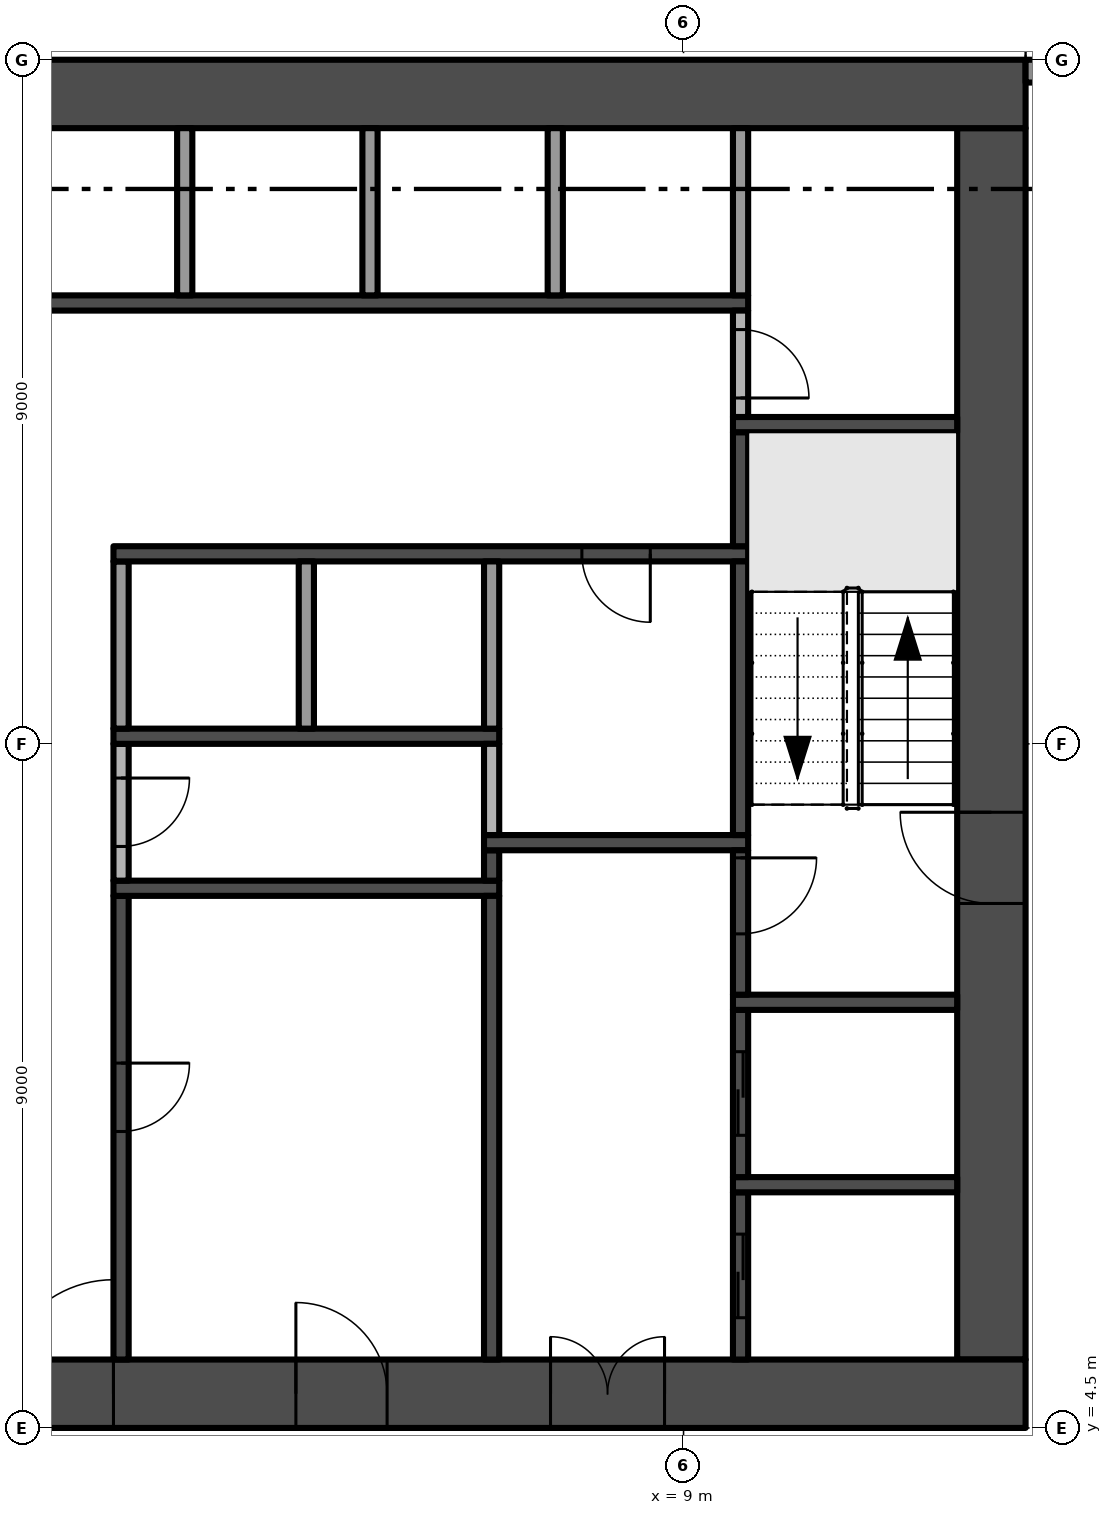
"""IFC4 building model, lengths in metres.
Left out: names, types, materials, properties, quantities, classifications, styles, units other than length and angle.
Written with IfcOpenShell. Run it as: python <this file> out.ifc"""

import sys

from ifc_helpers import new_model, si_unit, direction, frame, frame_2d, origin, place, context, subcontext, project, spatial, rectangle, extrude, element, fill, save


model = new_model("IFC4")
c1 = context("Model", 3, precision=1e-05, world=origin(), true_north=direction((0.0, 1.0)))
c2 = subcontext(c1, "Body", "Model", "MODEL_VIEW")
j1 = project(units=[si_unit("LENGTHUNIT", "METRE"), si_unit("PLANEANGLEUNIT", "RADIAN")], contexts=[c1])
p1 = place(None, origin())
s1 = spatial("IfcSite", under=j1, at=p1, CompositionType="ELEMENT")
p2 = place(p1, origin())
s2 = spatial("IfcBuilding", under=s1, at=p2, CompositionType="ELEMENT")
p3 = place(p2, frame((0.0, 0.0, 103.6)))
s3 = spatial("IfcBuildingStorey", under=s2, at=p3, CompositionType="ELEMENT", Elevation=103.6)
p4 = place(p3, frame((-13.5, 4.95, -0.3), z_axis=(0.0, 0.0, 1.0), x_axis=(1.0, 0.0, 0.0)))
e1 = element("IfcWall", 1, at=p4, inside=s3, PredefinedType="SHEAR", context=c2, shape_type="SweptSolid", body=[
    extrude(rectangle(XDim=27.0, YDim=0.9, at=frame_2d((13.5, 0.0))), origin(), (0.0, 0.0, 1.0), 3.8),
])
p5 = place(p4, frame((12.0, 0.0, 0.3)))
e2 = element("IfcOpeningElement", 2, at=p5, cuts=e1, PredefinedType="OPENING", context=c2, shape_type="SweptSolid", body=[
    extrude(rectangle(XDim=3.0, YDim=2.4, at=frame_2d((1.5, 1.2))), frame((0.0, 0.46, 0.0), z_axis=(0.0, -1.0, 0.0), x_axis=(1.0, 0.0, 0.0)), (0.0, 0.0, 1.0), 0.92),
])
p6 = place(p4, frame((4.9, 0.0, 0.3)))
e3 = element("IfcOpeningElement", 3, at=p6, cuts=e1, PredefinedType="OPENING", context=c2, shape_type="SweptSolid", body=[
    extrude(rectangle(XDim=1.2, YDim=2.2, at=frame_2d((0.6, 1.1))), frame((0.0, 0.46, 0.0), z_axis=(0.0, -1.0, 0.0), x_axis=(1.0, 0.0, 0.0)), (0.0, 0.0, 1.0), 0.92),
])
p7 = place(p4, frame((20.75, 0.0, 0.3)))
e4 = element("IfcOpeningElement", 4, at=p7, cuts=e1, PredefinedType="OPENING", context=c2, shape_type="SweptSolid", body=[
    extrude(rectangle(XDim=1.5, YDim=2.2, at=frame_2d((0.75, 1.1))), frame((0.0, 0.46, 0.0), z_axis=(0.0, -1.0, 0.0), x_axis=(1.0, 0.0, 0.0)), (0.0, 0.0, 1.0), 0.92),
])
p8 = place(p4, frame((17.4, 0.0, 0.3)))
e5 = element("IfcOpeningElement", 5, at=p8, cuts=e1, PredefinedType="OPENING", context=c2, shape_type="SweptSolid", body=[
    extrude(rectangle(XDim=1.2, YDim=2.2, at=frame_2d((0.6, 1.1))), frame((0.0, 0.46, 0.0), z_axis=(0.0, -1.0, 0.0), x_axis=(1.0, 0.0, 0.0)), (0.0, 0.0, 1.0), 0.92),
])
p9 = place(p3, frame((13.05, 5.4, -0.3), z_axis=(0.0, 0.0, 1.0), x_axis=(0.0, 1.0, 0.0)))
e6 = element("IfcWall", 6, at=p9, inside=s3, PredefinedType="SHEAR", context=c2, shape_type="SweptSolid", body=[
    extrude(rectangle(XDim=16.2, YDim=0.9, at=frame_2d((8.1, 0.0))), origin(), (0.0, 0.0, 1.0), 3.8),
])
p10 = place(p9, frame((6.0, 0.0, 0.3)))
e7 = element("IfcOpeningElement", 7, at=p10, cuts=e6, PredefinedType="OPENING", context=c2, shape_type="SweptSolid", body=[
    extrude(rectangle(XDim=1.2, YDim=2.2, at=frame_2d((0.6, 1.1))), frame((0.0, 0.46, 0.0), z_axis=(0.0, -1.0, 0.0), x_axis=(1.0, 0.0, 0.0)), (0.0, 0.0, 1.0), 0.92),
])
p11 = place(p3, frame((13.5, 22.05, -0.3), z_axis=(0.0, 0.0, 1.0), x_axis=(-1.0, 0.0, 0.0)))
e8 = element("IfcWall", 8, at=p11, inside=s3, PredefinedType="SHEAR", context=c2, shape_type="SweptSolid", body=[
    extrude(rectangle(XDim=27.0, YDim=0.9, at=frame_2d((13.5, 0.0))), origin(), (0.0, 0.0, 1.0), 3.8),
])
p12 = place(p3, frame((13.5, 22.35, 0.0), z_axis=(0.0, 0.0, 1.0), x_axis=(1.0, 0.0, 0.0)))
e9 = element("IfcWall", 9, at=p12, inside=s3, PredefinedType="SOLIDWALL", context=c2, shape_type="SweptSolid", body=[
    extrude(rectangle(XDim=3.875, YDim=0.3, at=frame_2d((1.938, 0.0))), origin(), (0.0, 0.0, 1.0), 3.5),
])
p13 = place(p12, frame((0.775, 0.0, 0.0)))
e10 = element("IfcOpeningElement", 10, at=p13, cuts=e9, PredefinedType="OPENING", context=c2, shape_type="SweptSolid", body=[
    extrude(rectangle(XDim=2.775, YDim=2.4, at=frame_2d((1.387, 1.2))), frame((0.0, 0.16, 0.0), z_axis=(0.0, -1.0, 0.0), x_axis=(1.0, 0.0, 0.0)), (0.0, 0.0, 1.0), 0.32),
])
p14 = place(p3, frame((-9.85, 19.3, 0.0), z_axis=(0.0, 0.0, 1.0), x_axis=(1.0, 0.0, 0.0)))
e11 = element("IfcWall", 11, at=p14, inside=s3, PredefinedType="SHEAR", context=c2, shape_type="SweptSolid", body=[
    extrude(rectangle(XDim=19.7, YDim=0.2, at=frame_2d((9.85, 0.0))), origin(), (0.0, 0.0, 1.0), 3.5),
])
p15 = place(p14, frame((0.769, 0.0, 0.0)))
e12 = element("IfcOpeningElement", 12, at=p15, cuts=e11, PredefinedType="OPENING", context=c2, shape_type="SweptSolid", body=[
    extrude(rectangle(XDim=1.1, YDim=2.1, at=frame_2d((0.55, 1.05))), frame((0.0, 0.11, 0.0), z_axis=(0.0, -1.0, 0.0), x_axis=(1.0, 0.0, 0.0)), (0.0, 0.0, 1.0), 0.22),
])
p16 = place(p14, frame((3.206, 0.0, 0.0)))
e13 = element("IfcOpeningElement", 13, at=p16, cuts=e11, PredefinedType="OPENING", context=c2, shape_type="SweptSolid", body=[
    extrude(rectangle(XDim=1.1, YDim=2.1, at=frame_2d((0.55, 1.05))), frame((0.0, 0.11, 0.0), z_axis=(0.0, -1.0, 0.0), x_axis=(1.0, 0.0, 0.0)), (0.0, 0.0, 1.0), 0.22),
])
p17 = place(p14, frame((5.644, 0.0, 0.0)))
e14 = element("IfcOpeningElement", 14, at=p17, cuts=e11, PredefinedType="OPENING", context=c2, shape_type="SweptSolid", body=[
    extrude(rectangle(XDim=1.1, YDim=2.1, at=frame_2d((0.55, 1.05))), frame((0.0, 0.11, 0.0), z_axis=(0.0, -1.0, 0.0), x_axis=(1.0, 0.0, 0.0)), (0.0, 0.0, 1.0), 0.22),
])
p18 = place(p14, frame((8.081, 0.0, 0.0)))
e15 = element("IfcOpeningElement", 15, at=p18, cuts=e11, PredefinedType="OPENING", context=c2, shape_type="SweptSolid", body=[
    extrude(rectangle(XDim=1.1, YDim=2.1, at=frame_2d((0.55, 1.05))), frame((0.0, 0.11, 0.0), z_axis=(0.0, -1.0, 0.0), x_axis=(1.0, 0.0, 0.0)), (0.0, 0.0, 1.0), 0.22),
])
p19 = place(p3, frame((1.6, 11.5, 0.0), z_axis=(0.0, 0.0, 1.0), x_axis=(0.0, -1.0, 0.0)))
e16 = element("IfcWall", 16, at=p19, inside=s3, PredefinedType="SHEAR", context=c2, shape_type="SweptSolid", body=[
    extrude(rectangle(XDim=6.1, YDim=0.2, at=frame_2d((3.05, 0.0))), origin(), (0.0, 0.0, 1.0), 3.5),
])
p20 = place(p19, frame((2.2, 0.0, 0.0)))
e17 = element("IfcOpeningElement", 17, at=p20, cuts=e16, PredefinedType="OPENING", context=c2, shape_type="SweptSolid", body=[
    extrude(rectangle(XDim=0.9, YDim=2.1, at=frame_2d((0.45, 1.05))), frame((0.0, 0.11, 0.0), z_axis=(0.0, -1.0, 0.0), x_axis=(1.0, 0.0, 0.0)), (0.0, 0.0, 1.0), 0.22),
])
p21 = place(p3, frame((1.5, 11.6, 0.0), z_axis=(0.0, 0.0, 1.0), x_axis=(1.0, 0.0, 0.0)))
e18 = element("IfcWall", 18, at=p21, inside=s3, PredefinedType="SHEAR", context=c2, shape_type="SweptSolid", body=[
    extrude(rectangle(XDim=5.075, YDim=0.2, at=frame_2d((2.538, 0.0))), origin(), (0.0, 0.0, 1.0), 3.5),
])
p22 = place(p3, frame((1.6, 13.5, 0.0), z_axis=(0.0, 0.0, 1.0), x_axis=(0.0, -1.0, 0.0)))
e19 = element("IfcWall", 19, at=p22, inside=s3, PredefinedType="PARTITIONING", context=c2, shape_type="SweptSolid", body=[
    extrude(rectangle(XDim=1.8, YDim=0.2, at=frame_2d((0.9, 0.0))), origin(), (0.0, 0.0, 1.0), 3.5),
])
p23 = place(p22, frame((0.45, 0.0, 0.0)))
e20 = element("IfcOpeningElement", 20, at=p23, cuts=e19, PredefinedType="OPENING", context=c2, shape_type="SweptSolid", body=[
    extrude(rectangle(XDim=0.9, YDim=2.1, at=frame_2d((0.45, 1.05))), frame((0.0, 0.11, 0.0), z_axis=(0.0, -1.0, 0.0), x_axis=(1.0, 0.0, 0.0)), (0.0, 0.0, 1.0), 0.22),
])
p24 = place(p3, frame((1.5, 13.6, 0.0), z_axis=(0.0, 0.0, 1.0), x_axis=(1.0, 0.0, 0.0)))
e21 = element("IfcWall", 21, at=p24, inside=s3, PredefinedType="SHEAR", context=c2, shape_type="SweptSolid", body=[
    extrude(rectangle(XDim=5.075, YDim=0.2, at=frame_2d((2.538, 0.0))), origin(), (0.0, 0.0, 1.0), 3.5),
])
p25 = place(p3, frame((1.6, 13.7, 0.0), z_axis=(0.0, 0.0, 1.0), x_axis=(0.0, 1.0, 0.0)))
e22 = element("IfcWall", 22, at=p25, inside=s3, PredefinedType="PARTITIONING", context=c2, shape_type="SweptSolid", body=[
    extrude(rectangle(XDim=2.2, YDim=0.2, at=frame_2d((1.1, 0.0))), origin(), (0.0, 0.0, 1.0), 3.5),
])
p26 = place(p3, frame((9.85, 16.0, 0.0), z_axis=(0.0, 0.0, 1.0), x_axis=(-1.0, 0.0, 0.0)))
e23 = element("IfcWall", 23, at=p26, inside=s3, PredefinedType="SHEAR", context=c2, shape_type="SweptSolid", body=[
    extrude(rectangle(XDim=8.35, YDim=0.2, at=frame_2d((4.175, 0.0))), origin(), (0.0, 0.0, 1.0), 3.5),
])
p27 = place(p26, frame((1.288, 0.0, 0.0)))
e24 = element("IfcOpeningElement", 24, at=p27, cuts=e23, PredefinedType="OPENING", context=c2, shape_type="SweptSolid", body=[
    extrude(rectangle(XDim=0.9, YDim=2.1, at=frame_2d((0.45, 1.05))), frame((0.0, 0.11, 0.0), z_axis=(0.0, -1.0, 0.0), x_axis=(1.0, 0.0, 0.0)), (0.0, 0.0, 1.0), 0.22),
])
for number, where, z_axis, x_axis in (
    (25, (2.438, 19.4, 0.0), (0.0, 0.0, 1.0), (0.0, 1.0, 0.0)),
    (26, (4.037, 13.7, 0.0), (0.0, 0.0, 1.0), (0.0, 1.0, 0.0)),
    (27, (4.875, 19.4, 0.0), (0.0, 0.0, 1.0), (0.0, 1.0, 0.0)),
):
    element("IfcWall", number, at=place(p3, frame(where, z_axis=z_axis, x_axis=x_axis)), inside=s3, PredefinedType="PARTITIONING", context=c2, shape_type="SweptSolid", body=[
        extrude(rectangle(XDim=2.2, YDim=0.2, at=frame_2d((1.1, 0.0))), origin(), (0.0, 0.0, 1.0), 3.5),
    ])
p28 = place(p3, frame((6.475, 5.4, 0.0), z_axis=(0.0, 0.0, 1.0), x_axis=(0.0, 1.0, 0.0)))
e28 = element("IfcWall", 28, at=p28, inside=s3, PredefinedType="SHEAR", context=c2, shape_type="SweptSolid", body=[
    extrude(rectangle(XDim=6.1, YDim=0.2, at=frame_2d((3.05, 0.0))), origin(), (0.0, 0.0, 1.0), 3.5),
])
p29 = place(p3, frame((6.475, 11.7, 0.0), z_axis=(0.0, 0.0, 1.0), x_axis=(0.0, 1.0, 0.0)))
e29 = element("IfcWall", 29, at=p29, inside=s3, PredefinedType="SHEAR", context=c2, shape_type="SweptSolid", body=[
    extrude(rectangle(XDim=0.4, YDim=0.2, at=frame_2d((0.2, 0.0))), origin(), (0.0, 0.0, 1.0), 3.5),
])
p30 = place(p3, frame((6.375, 12.2, 0.0), z_axis=(0.0, 0.0, 1.0), x_axis=(1.0, 0.0, 0.0)))
e30 = element("IfcWall", 30, at=p30, inside=s3, PredefinedType="SHEAR", context=c2, shape_type="SweptSolid", body=[
    extrude(rectangle(XDim=3.475, YDim=0.2, at=frame_2d((1.738, 0.0))), origin(), (0.0, 0.0, 1.0), 3.5),
])
p31 = place(p3, frame((6.475, 12.3, 0.0), z_axis=(0.0, 0.0, 1.0), x_axis=(0.0, 1.0, 0.0)))
e31 = element("IfcWall", 31, at=p31, inside=s3, PredefinedType="PARTITIONING", context=c2, shape_type="SweptSolid", body=[
    extrude(rectangle(XDim=1.2, YDim=0.2, at=frame_2d((0.6, 0.0))), origin(), (0.0, 0.0, 1.0), 3.5),
])
for number, where, z_axis, x_axis in (
    (32, (6.475, 13.7, 0.0), (0.0, 0.0, 1.0), (0.0, 1.0, 0.0)),
    (33, (7.312, 19.4, 0.0), (0.0, 0.0, 1.0), (0.0, 1.0, 0.0)),
):
    element("IfcWall", number, at=place(p3, frame(where, z_axis=z_axis, x_axis=x_axis)), inside=s3, PredefinedType="PARTITIONING", context=c2, shape_type="SweptSolid", body=[
        extrude(rectangle(XDim=2.2, YDim=0.2, at=frame_2d((1.1, 0.0))), origin(), (0.0, 0.0, 1.0), 3.5),
    ])
p32 = place(p3, frame((9.75, 5.4, 0.0), z_axis=(0.0, 0.0, 1.0), x_axis=(0.0, 1.0, 0.0)))
e34 = element("IfcWall", 34, at=p32, inside=s3, PredefinedType="SHEAR", context=c2, shape_type="SweptSolid", body=[
    extrude(rectangle(XDim=2.2, YDim=0.2, at=frame_2d((1.1, 0.0))), origin(), (0.0, 0.0, 1.0), 3.5),
])
p33 = place(p32, frame((0.55, 0.0, 0.0)))
e35 = element("IfcOpeningElement", 35, at=p33, cuts=e34, PredefinedType="OPENING", context=c2, shape_type="SweptSolid", body=[
    extrude(rectangle(XDim=1.1, YDim=2.1, at=frame_2d((0.55, 1.05))), frame((0.0, 0.11, 0.0), z_axis=(0.0, -1.0, 0.0), x_axis=(1.0, 0.0, 0.0)), (0.0, 0.0, 1.0), 0.22),
])
p34 = place(p3, frame((9.65, 7.7, 0.0), z_axis=(0.0, 0.0, 1.0), x_axis=(1.0, 0.0, 0.0)))
e36 = element("IfcWall", 36, at=p34, inside=s3, PredefinedType="SHEAR", context=c2, shape_type="SweptSolid", body=[
    extrude(rectangle(XDim=2.95, YDim=0.2, at=frame_2d((1.475, 0.0))), origin(), (0.0, 0.0, 1.0), 3.5),
])
p35 = place(p3, frame((9.75, 7.8, 0.0), z_axis=(0.0, 0.0, 1.0), x_axis=(0.0, 1.0, 0.0)))
e37 = element("IfcWall", 37, at=p35, inside=s3, PredefinedType="SHEAR", context=c2, shape_type="SweptSolid", body=[
    extrude(rectangle(XDim=2.2, YDim=0.2, at=frame_2d((1.1, 0.0))), origin(), (0.0, 0.0, 1.0), 3.5),
])
p36 = place(p35, frame((0.55, 0.0, 0.0)))
e38 = element("IfcOpeningElement", 38, at=p36, cuts=e37, PredefinedType="OPENING", context=c2, shape_type="SweptSolid", body=[
    extrude(rectangle(XDim=1.1, YDim=2.1, at=frame_2d((0.55, 1.05))), frame((0.0, 0.11, 0.0), z_axis=(0.0, -1.0, 0.0), x_axis=(1.0, 0.0, 0.0)), (0.0, 0.0, 1.0), 0.22),
])
p37 = place(p3, frame((9.65, 10.1, 0.0), z_axis=(0.0, 0.0, 1.0), x_axis=(1.0, 0.0, 0.0)))
e39 = element("IfcWall", 39, at=p37, inside=s3, PredefinedType="SHEAR", context=c2, shape_type="SweptSolid", body=[
    extrude(rectangle(XDim=2.95, YDim=0.2, at=frame_2d((1.475, 0.0))), origin(), (0.0, 0.0, 1.0), 3.5),
])
p38 = place(p3, frame((9.75, 12.1, 0.0), z_axis=(0.0, 0.0, 1.0), x_axis=(0.0, -1.0, 0.0)))
e40 = element("IfcWall", 40, at=p38, inside=s3, PredefinedType="SHEAR", context=c2, shape_type="SweptSolid", body=[
    extrude(rectangle(XDim=1.9, YDim=0.2, at=frame_2d((0.95, 0.0))), origin(), (0.0, 0.0, 1.0), 3.5),
])
p39 = place(p38, frame((0.1, 0.0, 0.0)))
e41 = element("IfcOpeningElement", 41, at=p39, cuts=e40, PredefinedType="OPENING", context=c2, shape_type="SweptSolid", body=[
    extrude(rectangle(XDim=1.0, YDim=2.2, at=frame_2d((0.5, 1.1))), frame((0.0, 0.11, 0.0), z_axis=(0.0, -1.0, 0.0), x_axis=(1.0, 0.0, 0.0)), (0.0, 0.0, 1.0), 0.22),
])
p40 = place(p3, frame((9.75, 12.3, 0.0), z_axis=(0.0, 0.0, 1.0), x_axis=(0.0, 1.0, 0.0)))
e42 = element("IfcWall", 42, at=p40, inside=s3, PredefinedType="SHEAR", context=c2, shape_type="SweptSolid", body=[
    extrude(rectangle(XDim=3.6, YDim=0.2, at=frame_2d((1.8, 0.0))), origin(), (0.0, 0.0, 1.0), 3.5),
])
p41 = place(p3, frame((9.75, 16.1, 0.0), z_axis=(0.0, 0.0, 1.0), x_axis=(0.0, 1.0, 0.0)))
e43 = element("IfcWall", 43, at=p41, inside=s3, PredefinedType="SHEAR", context=c2, shape_type="SweptSolid", body=[
    extrude(rectangle(XDim=1.5, YDim=0.2, at=frame_2d((0.75, 0.0))), origin(), (0.0, 0.0, 1.0), 3.5),
])
p42 = place(p3, frame((9.65, 17.7, 0.0), z_axis=(0.0, 0.0, 1.0), x_axis=(1.0, 0.0, 0.0)))
e44 = element("IfcWall", 44, at=p42, inside=s3, PredefinedType="SHEAR", context=c2, shape_type="SweptSolid", body=[
    extrude(rectangle(XDim=2.95, YDim=0.2, at=frame_2d((1.475, 0.0))), origin(), (0.0, 0.0, 1.0), 3.5),
])
p43 = place(p3, frame((9.75, 19.2, 0.0), z_axis=(0.0, 0.0, 1.0), x_axis=(0.0, -1.0, 0.0)))
e45 = element("IfcWall", 45, at=p43, inside=s3, PredefinedType="PARTITIONING", context=c2, shape_type="SweptSolid", body=[
    extrude(rectangle(XDim=1.4, YDim=0.2, at=frame_2d((0.7, 0.0))), origin(), (0.0, 0.0, 1.0), 3.5),
])
p44 = place(p43, frame((0.25, 0.0, 0.0)))
e46 = element("IfcOpeningElement", 46, at=p44, cuts=e45, PredefinedType="OPENING", context=c2, shape_type="SweptSolid", body=[
    extrude(rectangle(XDim=0.9, YDim=2.1, at=frame_2d((0.45, 1.05))), frame((0.0, 0.11, 0.0), z_axis=(0.0, -1.0, 0.0), x_axis=(1.0, 0.0, 0.0)), (0.0, 0.0, 1.0), 0.22),
])
p45 = place(p3, frame((9.75, 19.4, 0.0), z_axis=(0.0, 0.0, 1.0), x_axis=(0.0, 1.0, 0.0)))
e47 = element("IfcWall", 47, at=p45, inside=s3, PredefinedType="PARTITIONING", context=c2, shape_type="SweptSolid", body=[
    extrude(rectangle(XDim=2.2, YDim=0.2, at=frame_2d((1.1, 0.0))), origin(), (0.0, 0.0, 1.0), 3.5),
])
p46 = place(p5, frame((3.0, 0.0, 0.0), z_axis=(0.0, 0.0, 1.0), x_axis=(-1.0, 0.0, 0.0)))
e48 = element("IfcDoor", 48, at=p46, inside=s3, OperationType="DOUBLE_DOOR_SINGLE_SWING", PredefinedType="DOOR", context=c2, shape_type="SweptSolid", body=[
    extrude(rectangle(XDim=3.0, YDim=2.4, at=frame_2d((1.5, 1.2))), frame((0.0, 0.025, 0.0), z_axis=(0.0, -1.0, 0.0), x_axis=(1.0, 0.0, 0.0)), (0.0, 0.0, 1.0), 0.05),
])
fill(e2, e48)
p47 = place(p10, frame((1.2, 0.0, 0.0), z_axis=(0.0, 0.0, 1.0), x_axis=(-1.0, 0.0, 0.0)))
e49 = element("IfcDoor", 49, at=p47, inside=s3, OperationType="SINGLE_SWING_LEFT", PredefinedType="DOOR", context=c2, shape_type="SweptSolid", body=[
    extrude(rectangle(XDim=1.2, YDim=2.2, at=frame_2d((0.6, 1.1))), frame((0.0, 0.025, 0.0), z_axis=(0.0, -1.0, 0.0), x_axis=(1.0, 0.0, 0.0)), (0.0, 0.0, 1.0), 0.05),
])
fill(e7, e49)
p48 = place(p7, frame((1.5, 0.0, 0.0), z_axis=(0.0, 0.0, 1.0), x_axis=(-1.0, 0.0, 0.0)))
e50 = element("IfcDoor", 50, at=p48, inside=s3, OperationType="DOUBLE_DOOR_SINGLE_SWING", PredefinedType="DOOR", context=c2, shape_type="SweptSolid", body=[
    extrude(rectangle(XDim=1.5, YDim=2.2, at=frame_2d((0.75, 1.1))), frame((0.0, 0.025, 0.0), z_axis=(0.0, -1.0, 0.0), x_axis=(1.0, 0.0, 0.0)), (0.0, 0.0, 1.0), 0.05),
])
fill(e4, e50)
p49 = place(p8, frame((1.2, 0.0, 0.0), z_axis=(0.0, 0.0, 1.0), x_axis=(-1.0, 0.0, 0.0)))
e51 = element("IfcDoor", 51, at=p49, inside=s3, OperationType="SINGLE_SWING_RIGHT", PredefinedType="DOOR", context=c2, shape_type="SweptSolid", body=[
    extrude(rectangle(XDim=1.2, YDim=2.2, at=frame_2d((0.6, 1.1))), frame((0.0, 0.025, 0.0), z_axis=(0.0, -1.0, 0.0), x_axis=(1.0, 0.0, 0.0)), (0.0, 0.0, 1.0), 0.05),
])
fill(e5, e51)
p50 = place(p39, origin())
e52 = element("IfcDoor", 52, at=p50, inside=s3, OperationType="SINGLE_SWING_LEFT", PredefinedType="DOOR", context=c2, shape_type="SweptSolid", body=[
    extrude(rectangle(XDim=1.0, YDim=2.2, at=frame_2d((0.5, 1.1))), frame((0.0, 0.025, 0.0), z_axis=(0.0, -1.0, 0.0), x_axis=(1.0, 0.0, 0.0)), (0.0, 0.0, 1.0), 0.05),
])
fill(e41, e52)
p51 = place(p33, origin())
e53 = element("IfcDoor", 53, at=p51, inside=s3, OperationType="SLIDING_TO_RIGHT", PredefinedType="DOOR", context=c2, shape_type="SweptSolid", body=[
    extrude(rectangle(XDim=1.1, YDim=2.1, at=frame_2d((0.55, 1.05))), frame((0.0, 0.025, 0.0), z_axis=(0.0, -1.0, 0.0), x_axis=(1.0, 0.0, 0.0)), (0.0, 0.0, 1.0), 0.05),
])
fill(e35, e53)
p52 = place(p36, origin())
e54 = element("IfcDoor", 54, at=p52, inside=s3, OperationType="SLIDING_TO_RIGHT", PredefinedType="DOOR", context=c2, shape_type="SweptSolid", body=[
    extrude(rectangle(XDim=1.1, YDim=2.1, at=frame_2d((0.55, 1.05))), frame((0.0, 0.025, 0.0), z_axis=(0.0, -1.0, 0.0), x_axis=(1.0, 0.0, 0.0)), (0.0, 0.0, 1.0), 0.05),
])
fill(e38, e54)
p53 = place(p20, origin())
e55 = element("IfcDoor", 55, at=p53, inside=s3, OperationType="SINGLE_SWING_LEFT", PredefinedType="DOOR", context=c2, shape_type="SweptSolid", body=[
    extrude(rectangle(XDim=0.9, YDim=2.1, at=frame_2d((0.45, 1.05))), frame((0.0, 0.025, 0.0), z_axis=(0.0, -1.0, 0.0), x_axis=(1.0, 0.0, 0.0)), (0.0, 0.0, 1.0), 0.05),
])
fill(e17, e55)
p54 = place(p23, origin())
e56 = element("IfcDoor", 56, at=p54, inside=s3, OperationType="SINGLE_SWING_LEFT", PredefinedType="DOOR", context=c2, shape_type="SweptSolid", body=[
    extrude(rectangle(XDim=0.9, YDim=2.1, at=frame_2d((0.45, 1.05))), frame((0.0, 0.025, 0.0), z_axis=(0.0, -1.0, 0.0), x_axis=(1.0, 0.0, 0.0)), (0.0, 0.0, 1.0), 0.05),
])
fill(e20, e56)
p55 = place(p27, origin())
e57 = element("IfcDoor", 57, at=p55, inside=s3, OperationType="SINGLE_SWING_LEFT", PredefinedType="DOOR", context=c2, shape_type="SweptSolid", body=[
    extrude(rectangle(XDim=0.9, YDim=2.1, at=frame_2d((0.45, 1.05))), frame((0.0, 0.025, 0.0), z_axis=(0.0, -1.0, 0.0), x_axis=(1.0, 0.0, 0.0)), (0.0, 0.0, 1.0), 0.05),
])
fill(e24, e57)
p56 = place(p44, origin())
e58 = element("IfcDoor", 58, at=p56, inside=s3, OperationType="SINGLE_SWING_RIGHT", PredefinedType="DOOR", context=c2, shape_type="SweptSolid", body=[
    extrude(rectangle(XDim=0.9, YDim=2.1, at=frame_2d((0.45, 1.05))), frame((0.0, 0.025, 0.0), z_axis=(0.0, -1.0, 0.0), x_axis=(1.0, 0.0, 0.0)), (0.0, 0.0, 1.0), 0.05),
])
fill(e46, e58)
save(model, sys.argv[1])
